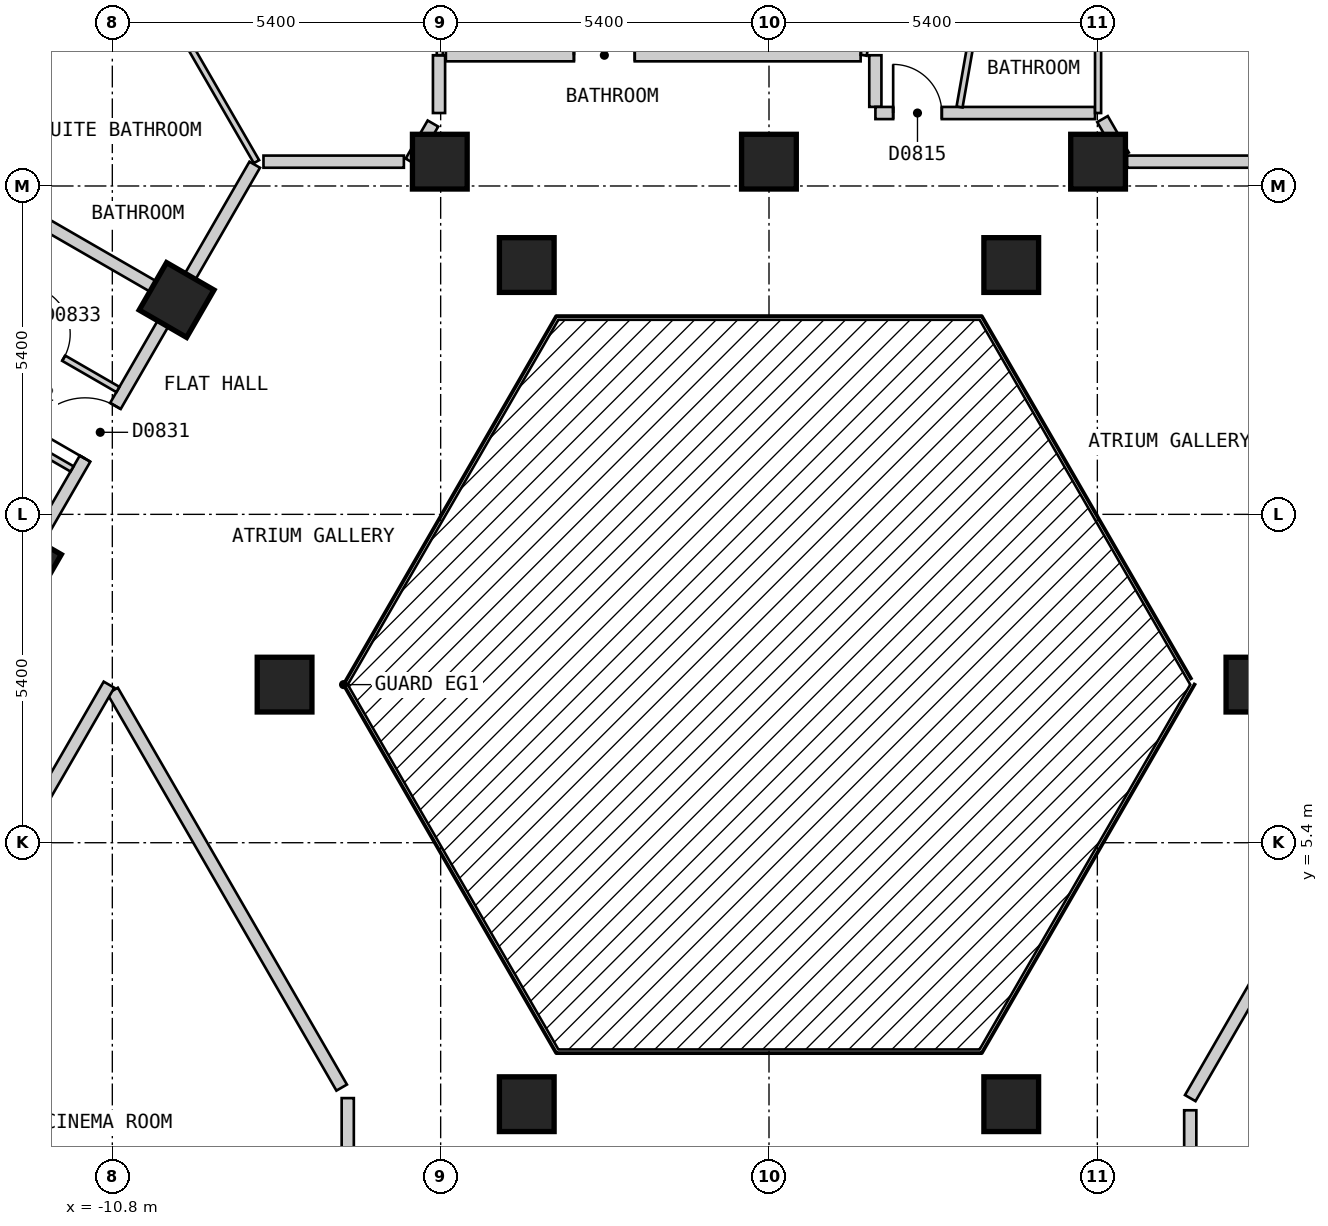
"""IFC4 building model, lengths in metres.
Left out: names, types, materials, properties, quantities, classifications, styles, units other than length and angle.
Written with IfcOpenShell. Run it as: python <this file> out.ifc"""

import sys

from ifc_helpers import new_model, si_unit, direction, frame, frame_2d, origin, origin_2d, place, context, subcontext, project, spatial, rectangle, extrude, element, fill, save


model = new_model("IFC4")
c1 = context("Model", 3, precision=1e-05, world=origin(), true_north=direction((0.0, 1.0)))
c2 = subcontext(c1, "Body", "Model", "MODEL_VIEW")
j1 = project(units=[si_unit("LENGTHUNIT", "METRE"), si_unit("PLANEANGLEUNIT", "RADIAN")], contexts=[c1])
p1 = place(None, origin())
s1 = spatial("IfcSite", under=j1, at=p1, CompositionType="ELEMENT")
p2 = place(p1, origin())
s2 = spatial("IfcBuilding", under=s1, at=p2, CompositionType="ELEMENT")
p3 = place(p2, frame((0.0, 0.0, 84.0)))
s3 = spatial("IfcBuildingStorey", under=s2, at=p3, CompositionType="ELEMENT", Elevation=84.0)
for number, where, z_axis, x_axis in (
    (1, (3.984, 1.1, 0.0), (0.0, 0.0, 1.0), (1.0, 0.0, 0.0)),
    (2, (7.967, 8.0, 0.0), (0.0, 0.0, 1.0), (1.0, 0.0, 0.0)),
    (3, (5.412, 16.6, 0.0), (0.0, 0.0, 1.0), (-1.0, 0.0, 0.0)),
    (4, (3.984, 14.9, 0.0), (0.0, 0.0, 1.0), (1.0, 0.0, 0.0)),
    (5, (-0.001, 16.6, 0.0), (0.0, 0.0, 1.0), (-1.0, 0.0, 0.0)),
    (6, (-3.984, 14.9, 0.0), (0.0, 0.0, 1.0), (1.0, 0.0, 0.0)),
    (7, (-5.414, 16.6, 0.0), (0.0, 0.0, 1.0), (-1.0, 0.0, 0.0)),
    (8, (-9.743, 14.325, 0.0), (0.0, 0.0, 1.0), (-0.5, -0.866, 0.0)),
    (9, (-7.967, 8.0, 0.0), (0.0, 0.0, 1.0), (1.0, 0.0, 0.0)),
    (10, (-12.254, 9.975, 0.0), (0.0, 0.0, 1.0), (-0.5, -0.866, 0.0)),
    (11, (-3.984, 1.1, 0.0), (0.0, 0.0, 1.0), (1.0, 0.0, 0.0)),
):
    element("IfcColumn", number, at=place(p3, frame(where, z_axis=z_axis, x_axis=x_axis)), inside=s3, PredefinedType="COLUMN", context=c2, shape_type="SweptSolid", body=[
        extrude(rectangle(XDim=0.9, YDim=0.9, at=origin_2d()), origin(), (0.0, 0.0, 1.0), 3.0),
    ])
p4 = place(p3, frame((-10.796, 7.899, 0.0), z_axis=(0.0, 0.0, 1.0), x_axis=(0.500010383074, -0.866019409031, 0.0)))
e12 = element("IfcWall", 12, at=p4, inside=s3, PredefinedType="PARTITIONING", context=c2, shape_type="SweptSolid", body=[
    extrude(rectangle(XDim=7.535, YDim=0.2, at=frame_2d((3.768, 0.0))), origin(), (0.0, 0.0, 1.0), 2.7),
])
p5 = place(p3, frame((5.485, 17.3, 0.0), z_axis=(0.0, 0.0, 1.0), x_axis=(0.499437640892, -0.866349838611, 0.0)))
e13 = element("IfcWall", 13, at=p5, inside=s3, PredefinedType="PARTITIONING", context=c2, shape_type="SweptSolid", body=[
    extrude(rectangle(XDim=0.693, YDim=0.2, at=frame_2d((0.346, 0.0))), origin(), (0.0, 0.0, 1.0), 2.7),
])
p6 = place(p3, frame((6.928, 1.0, 0.0), z_axis=(0.0, 0.0, 1.0), x_axis=(0.0, -1.0, 0.0)))
e14 = element("IfcWall", 14, at=p6, inside=s3, PredefinedType="PARTITIONING", context=c2, shape_type="SweptSolid", body=[
    extrude(rectangle(XDim=3.699, YDim=0.2, at=frame_2d((1.85, 0.0))), origin(), (0.0, 0.0, 1.0), 2.7),
])
p7 = place(p3, frame((1.749, 18.35, 0.0), z_axis=(0.0, 0.0, 1.0), x_axis=(0.0, -1.0, 0.0)))
e15 = element("IfcWall", 15, at=p7, inside=s3, PredefinedType="PARTITIONING", context=c2, shape_type="SweptSolid", body=[
    extrude(rectangle(XDim=0.849, YDim=0.2, at=frame_2d((0.425, 0.0))), origin(), (0.0, 0.0, 1.0), 2.7),
])
p8 = place(p3, frame((-8.314, 16.6, 0.0), z_axis=(0.0, 0.0, 1.0), x_axis=(1.0, 0.0, 0.0)))
e16 = element("IfcWall", 16, at=p8, inside=s3, PredefinedType="PARTITIONING", context=c2, shape_type="SweptSolid", body=[
    extrude(rectangle(XDim=2.309, YDim=0.2, at=frame_2d((1.155, 0.0))), origin(), (0.0, 0.0, 1.0), 2.7),
])
p9 = place(p3, frame((5.889, 16.6, 0.0), z_axis=(0.0, 0.0, 1.0), x_axis=(1.0, 0.0, 0.0)))
e17 = element("IfcWall", 17, at=p9, inside=s3, PredefinedType="PARTITIONING", context=c2, shape_type="SweptSolid", body=[
    extrude(rectangle(XDim=2.483, YDim=0.2, at=frame_2d((1.242, 0.0))), origin(), (0.0, 0.0, 1.0), 2.7),
])
p10 = place(p3, frame((1.75, 17.4, 0.0), z_axis=(0.0, 0.0, 1.0), x_axis=(1.0, 0.0, 0.0)))
e18 = element("IfcWall", 18, at=p10, inside=s3, PredefinedType="PARTITIONING", context=c2, shape_type="SweptSolid", body=[
    extrude(rectangle(XDim=3.612, YDim=0.2, at=frame_2d((1.806, 0.0))), origin(), (0.0, 0.0, 1.0), 2.7),
])
p11 = place(p10, frame((0.292, 0.0, 0.0)))
e19 = element("IfcOpeningElement", 19, at=p11, cuts=e18, PredefinedType="OPENING", context=c2, shape_type="SweptSolid", body=[
    extrude(rectangle(XDim=0.8, YDim=2.1, at=frame_2d((0.4, 1.05))), frame((0.0, 0.11, 0.0), z_axis=(0.0, -1.0, 0.0), x_axis=(1.0, 0.0, 0.0)), (0.0, 0.0, 1.0), 0.22),
])
p12 = place(p3, frame((-5.314, 18.35, 0.0), z_axis=(0.0, 0.0, 1.0), x_axis=(1.0, 0.0, 0.0)))
e20 = element("IfcWall", 20, at=p12, inside=s3, PredefinedType="PARTITIONING", context=c2, shape_type="SweptSolid", body=[
    extrude(rectangle(XDim=6.821, YDim=0.2, at=frame_2d((3.411, 0.0))), origin(), (0.0, 0.0, 1.0), 2.7),
])
p13 = place(p12, frame((2.106, 0.0, 0.0)))
e21 = element("IfcOpeningElement", 21, at=p13, cuts=e20, PredefinedType="OPENING", context=c2, shape_type="SweptSolid", body=[
    extrude(rectangle(XDim=1.0, YDim=2.1, at=frame_2d((0.5, 1.05))), frame((0.0, 0.11, 0.0), z_axis=(0.0, -1.0, 0.0), x_axis=(1.0, 0.0, 0.0)), (0.0, 0.0, 1.0), 0.22),
])
p14 = place(p3, frame((6.928, 1.2, 0.0), z_axis=(0.0, 0.0, 1.0), x_axis=(0.500055327065, 0.865993458332, 0.0)))
e22 = element("IfcWall", 22, at=p14, inside=s3, PredefinedType="PARTITIONING", context=c2, shape_type="SweptSolid", body=[
    extrude(rectangle(XDim=7.851, YDim=0.2, at=frame_2d((3.926, 0.0))), origin(), (0.0, 0.0, 1.0), 2.7),
])
p15 = place(p3, frame((-16.05, -1.0, 0.0), z_axis=(0.0, 0.0, 1.0), x_axis=(0.499962449088, 0.866047082728, 0.0)))
e23 = element("IfcWall", 23, at=p15, inside=s3, PredefinedType="PARTITIONING", context=c2, shape_type="SweptSolid", body=[
    extrude(rectangle(XDim=10.391, YDim=0.2, at=frame_2d((5.195, 0.0))), origin(), (0.0, 0.0, 1.0), 2.7),
])
p16 = place(p15, frame((4.745, 0.0, 0.0)))
e24 = element("IfcOpeningElement", 24, at=p16, cuts=e23, PredefinedType="OPENING", context=c2, shape_type="SweptSolid", body=[
    extrude(rectangle(XDim=0.9, YDim=2.1, at=frame_2d((0.45, 1.05))), frame((0.0, 0.11, 0.0), z_axis=(0.0, -1.0, 0.0), x_axis=(1.0, 0.0, 0.0)), (0.0, 0.0, 1.0), 0.22),
])
p17 = place(p3, frame((-5.889, 16.6, 0.0), z_axis=(0.0, 0.0, 1.0), x_axis=(0.499839240638, 0.866118198353, 0.0)))
e25 = element("IfcWall", 25, at=p17, inside=s3, PredefinedType="PARTITIONING", context=c2, shape_type="SweptSolid", body=[
    extrude(rectangle(XDim=0.724, YDim=0.2, at=frame_2d((0.362, 0.0))), origin(), (0.0, 0.0, 1.0), 2.7),
])
p18 = place(p3, frame((-18.562, -0.951, 0.0), z_axis=(0.0, 0.0, 1.0), x_axis=(0.499992962407, 0.866029466902, 0.0)))
e26 = element("IfcWall", 26, at=p18, inside=s3, PredefinedType="PARTITIONING", context=c2, shape_type="SweptSolid", body=[
    extrude(rectangle(XDim=20.208, YDim=0.2, at=frame_2d((10.104, 0.0))), origin(), (0.0, 0.0, 1.0), 2.7),
])
p19 = place(p18, frame((14.627, 0.0, 0.0)))
e27 = element("IfcOpeningElement", 27, at=p19, cuts=e26, PredefinedType="OPENING", context=c2, shape_type="SweptSolid", body=[
    extrude(rectangle(XDim=1.0, YDim=2.1, at=frame_2d((0.5, 1.05))), frame((0.0, 0.11, 0.0), z_axis=(0.0, -1.0, 0.0), x_axis=(1.0, 0.0, 0.0)), (0.0, 0.0, 1.0), 0.22),
])
p20 = place(p18, frame((4.581, 0.0, 0.0)))
e28 = element("IfcOpeningElement", 28, at=p20, cuts=e26, PredefinedType="OPENING", context=c2, shape_type="SweptSolid", body=[
    extrude(rectangle(XDim=1.0, YDim=2.1, at=frame_2d((0.5, 1.05))), frame((0.0, 0.11, 0.0), z_axis=(0.0, -1.0, 0.0), x_axis=(1.0, 0.0, 0.0)), (0.0, 0.0, 1.0), 0.22),
])
p21 = place(p3, frame((-5.427, 17.4, 0.0), z_axis=(0.0, 0.0, 1.0), x_axis=(0.0, 1.0, 0.0)))
e29 = element("IfcWall", 29, at=p21, inside=s3, PredefinedType="PARTITIONING", context=c2, shape_type="SweptSolid", body=[
    extrude(rectangle(XDim=0.95, YDim=0.2, at=frame_2d((0.475, 0.0))), origin(), (0.0, 0.0, 1.0), 2.7),
])
p22 = place(p3, frame((-6.928, -2.799, 0.0), z_axis=(0.0, 0.0, 1.0), x_axis=(0.0, 1.0, 0.0)))
e30 = element("IfcWall", 30, at=p22, inside=s3, PredefinedType="PARTITIONING", context=c2, shape_type="SweptSolid", body=[
    extrude(rectangle(XDim=3.999, YDim=0.2, at=frame_2d((2.0, 0.0))), origin(), (0.0, 0.0, 1.0), 2.7),
])
p23 = place(p3, frame((-10.742, 20.606, 0.0), z_axis=(0.0, 0.0, 1.0), x_axis=(0.50003312339, -0.866006279142, 0.0)))
e31 = element("IfcWall", 31, at=p23, inside=s3, PredefinedType="PARTITIONING", context=c2, shape_type="SweptSolid", body=[
    extrude(rectangle(XDim=4.626, YDim=0.1, at=frame_2d((2.313, 0.0))), origin(), (0.0, 0.0, 1.0), 2.7),
])
p24 = place(p3, frame((-13.981, 13.002, 0.0), z_axis=(0.0, 0.0, 1.0), x_axis=(0.86595634977, -0.500119585993, 0.0)))
e32 = element("IfcWall", 32, at=p24, inside=s3, PredefinedType="PARTITIONING", context=c2, shape_type="SweptSolid", body=[
    extrude(rectangle(XDim=2.909, YDim=0.1, at=frame_2d((1.455, 0.0))), origin(), (0.0, 0.0, 1.0), 2.7),
])
p25 = place(p24, frame((1.029, 0.0, 0.0)))
e33 = element("IfcOpeningElement", 33, at=p25, cuts=e32, PredefinedType="OPENING", context=c2, shape_type="SweptSolid", body=[
    extrude(rectangle(XDim=0.9, YDim=2.1, at=frame_2d((0.45, 1.05))), frame((0.0, 0.06, 0.0), z_axis=(0.0, -1.0, 0.0), x_axis=(1.0, 0.0, 0.0)), (0.0, 0.0, 1.0), 0.12),
])
p26 = place(p3, frame((-13.228, 14.308, 0.0), z_axis=(0.0, 0.0, 1.0), x_axis=(0.866003949776, -0.500037157592, 0.0)))
e34 = element("IfcWall", 34, at=p26, inside=s3, PredefinedType="PARTITIONING", context=c2, shape_type="SweptSolid", body=[
    extrude(rectangle(XDim=2.91, YDim=0.1, at=frame_2d((1.455, 0.0))), origin(), (0.0, 0.0, 1.0), 2.7),
])
p27 = place(p26, frame((1.08, 0.0, 0.0)))
e35 = element("IfcOpeningElement", 35, at=p27, cuts=e34, PredefinedType="OPENING", context=c2, shape_type="SweptSolid", body=[
    extrude(rectangle(XDim=0.8, YDim=2.1, at=frame_2d((0.4, 1.05))), frame((0.0, 0.06, 0.0), z_axis=(0.0, -1.0, 0.0), x_axis=(1.0, 0.0, 0.0)), (0.0, 0.0, 1.0), 0.12),
])
p28 = place(p3, frame((-13.328, 16.511, 0.0), z_axis=(0.0, 0.0, 1.0), x_axis=(0.518570528669, 0.855034857065, 0.0)))
e36 = element("IfcWall", 36, at=p28, inside=s3, PredefinedType="PARTITIONING", context=c2, shape_type="SweptSolid", body=[
    extrude(rectangle(XDim=4.83, YDim=0.1, at=frame_2d((2.415, 0.0))), origin(), (0.0, 0.0, 1.0), 2.7),
])
p29 = place(p28, frame((1.995, 0.0, 0.0)))
e37 = element("IfcOpeningElement", 37, at=p29, cuts=e36, PredefinedType="OPENING", context=c2, shape_type="SweptSolid", body=[
    extrude(rectangle(XDim=0.8, YDim=2.1, at=frame_2d((0.4, 1.05))), frame((0.0, 0.06, 0.0), z_axis=(0.0, -1.0, 0.0), x_axis=(1.0, 0.0, 0.0)), (0.0, 0.0, 1.0), 0.12),
])
p30 = place(p3, frame((3.134, 17.5, 0.0), z_axis=(0.0, 0.0, 1.0), x_axis=(0.172821216702, 0.984953210593, 0.0)))
e38 = element("IfcWall", 38, at=p30, inside=s3, PredefinedType="PARTITIONING", context=c2, shape_type="SweptSolid", body=[
    extrude(rectangle(XDim=4.97, YDim=0.1, at=frame_2d((2.485, 0.0))), origin(), (0.0, 0.0, 1.0), 2.7),
])
p31 = place(p30, frame((2.059, 0.0, 0.0)))
e39 = element("IfcOpeningElement", 39, at=p31, cuts=e38, PredefinedType="OPENING", context=c2, shape_type="SweptSolid", body=[
    extrude(rectangle(XDim=0.8, YDim=2.1, at=frame_2d((0.4, 1.05))), frame((0.0, 0.06, 0.0), z_axis=(0.0, -1.0, 0.0), x_axis=(1.0, 0.0, 0.0)), (0.0, 0.0, 1.0), 0.12),
])
p32 = place(p3, frame((1.557, 18.35, 0.0), z_axis=(0.0, 0.0, 1.0), x_axis=(0.173062973099, 0.984910761106, 0.0)))
e40 = element("IfcWall", 40, at=p32, inside=s3, PredefinedType="PARTITIONING", context=c2, shape_type="SweptSolid", body=[
    extrude(rectangle(XDim=4.242, YDim=0.1, at=frame_2d((2.121, 0.0))), origin(), (0.0, 0.0, 1.0), 2.7),
])
p33 = place(p32, frame((1.671, 0.0, 0.0)))
e41 = element("IfcOpeningElement", 41, at=p33, cuts=e40, PredefinedType="OPENING", context=c2, shape_type="SweptSolid", body=[
    extrude(rectangle(XDim=0.9, YDim=2.1, at=frame_2d((0.45, 1.05))), frame((0.0, 0.06, 0.0), z_axis=(0.0, -1.0, 0.0), x_axis=(1.0, 0.0, 0.0)), (0.0, 0.0, 1.0), 0.12),
])
p34 = place(p3, frame((5.412, 17.4, 0.0), z_axis=(0.0, 0.0, 1.0), x_axis=(0.0, 1.0, 0.0)))
e42 = element("IfcWall", 42, at=p34, inside=s3, PredefinedType="PARTITIONING", context=c2, shape_type="SweptSolid", body=[
    extrude(rectangle(XDim=4.925, YDim=0.1, at=frame_2d((2.462, 0.0))), origin(), (0.0, 0.0, 1.0), 2.7),
])
p35 = place(p3, frame((-5.414, 18.35, 0.0), z_axis=(0.0, 0.0, 1.0), x_axis=(0.0, 1.0, 0.0)))
e43 = element("IfcWall", 43, at=p35, inside=s3, PredefinedType="PARTITIONING", context=c2, shape_type="SweptSolid", body=[
    extrude(rectangle(XDim=4.15, YDim=0.1, at=frame_2d((2.075, 0.0))), origin(), (0.0, 0.0, 1.0), 2.7),
])
p36 = place(p3, frame((-18.489, 19.375, 0.0), z_axis=(0.0, 0.0, 1.0), x_axis=(0.866016855193, -0.500014806302, 0.0)))
e44 = element("IfcWall", 44, at=p36, inside=s3, PredefinedType="PARTITIONING", context=c2, shape_type="SweptSolid", body=[
    extrude(rectangle(XDim=10.0, YDim=0.2, at=frame_2d((5.0, 0.0))), origin(), (0.0, 0.0, 1.0), 2.7),
])
p37 = place(p11, origin())
e45 = element("IfcDoor", 45, at=p37, inside=s3, OperationType="SINGLE_SWING_LEFT", PredefinedType="DOOR", context=c2, shape_type="SweptSolid", body=[
    extrude(rectangle(XDim=0.8, YDim=2.1, at=frame_2d((0.4, 1.05))), frame((0.0, 0.025, 0.0), z_axis=(0.0, -1.0, 0.0), x_axis=(1.0, 0.0, 0.0)), (0.0, 0.0, 1.0), 0.05),
])
fill(e19, e45)
p38 = place(p13, origin())
e46 = element("IfcDoor", 46, at=p38, inside=s3, OperationType="SINGLE_SWING_LEFT", PredefinedType="DOOR", context=c2, shape_type="SweptSolid", body=[
    extrude(rectangle(XDim=1.0, YDim=2.1, at=frame_2d((0.5, 1.05))), frame((0.0, 0.025, 0.0), z_axis=(0.0, -1.0, 0.0), x_axis=(1.0, 0.0, 0.0)), (0.0, 0.0, 1.0), 0.05),
])
fill(e21, e46)
p39 = place(p19, origin())
e47 = element("IfcDoor", 47, at=p39, inside=s3, OperationType="SINGLE_SWING_LEFT", PredefinedType="DOOR", context=c2, shape_type="SweptSolid", body=[
    extrude(rectangle(XDim=1.0, YDim=2.1, at=frame_2d((0.5, 1.05))), frame((0.0, 0.025, 0.0), z_axis=(0.0, -1.0, 0.0), x_axis=(1.0, 0.0, 0.0)), (0.0, 0.0, 1.0), 0.05),
])
fill(e27, e47)
p40 = place(p27, origin())
e48 = element("IfcDoor", 48, at=p40, inside=s3, OperationType="SINGLE_SWING_LEFT", PredefinedType="DOOR", context=c2, shape_type="SweptSolid", body=[
    extrude(rectangle(XDim=0.8, YDim=2.1, at=frame_2d((0.4, 1.05))), frame((0.0, 0.025, 0.0), z_axis=(0.0, -1.0, 0.0), x_axis=(1.0, 0.0, 0.0)), (0.0, 0.0, 1.0), 0.05),
])
fill(e35, e48)
save(model, sys.argv[1])
